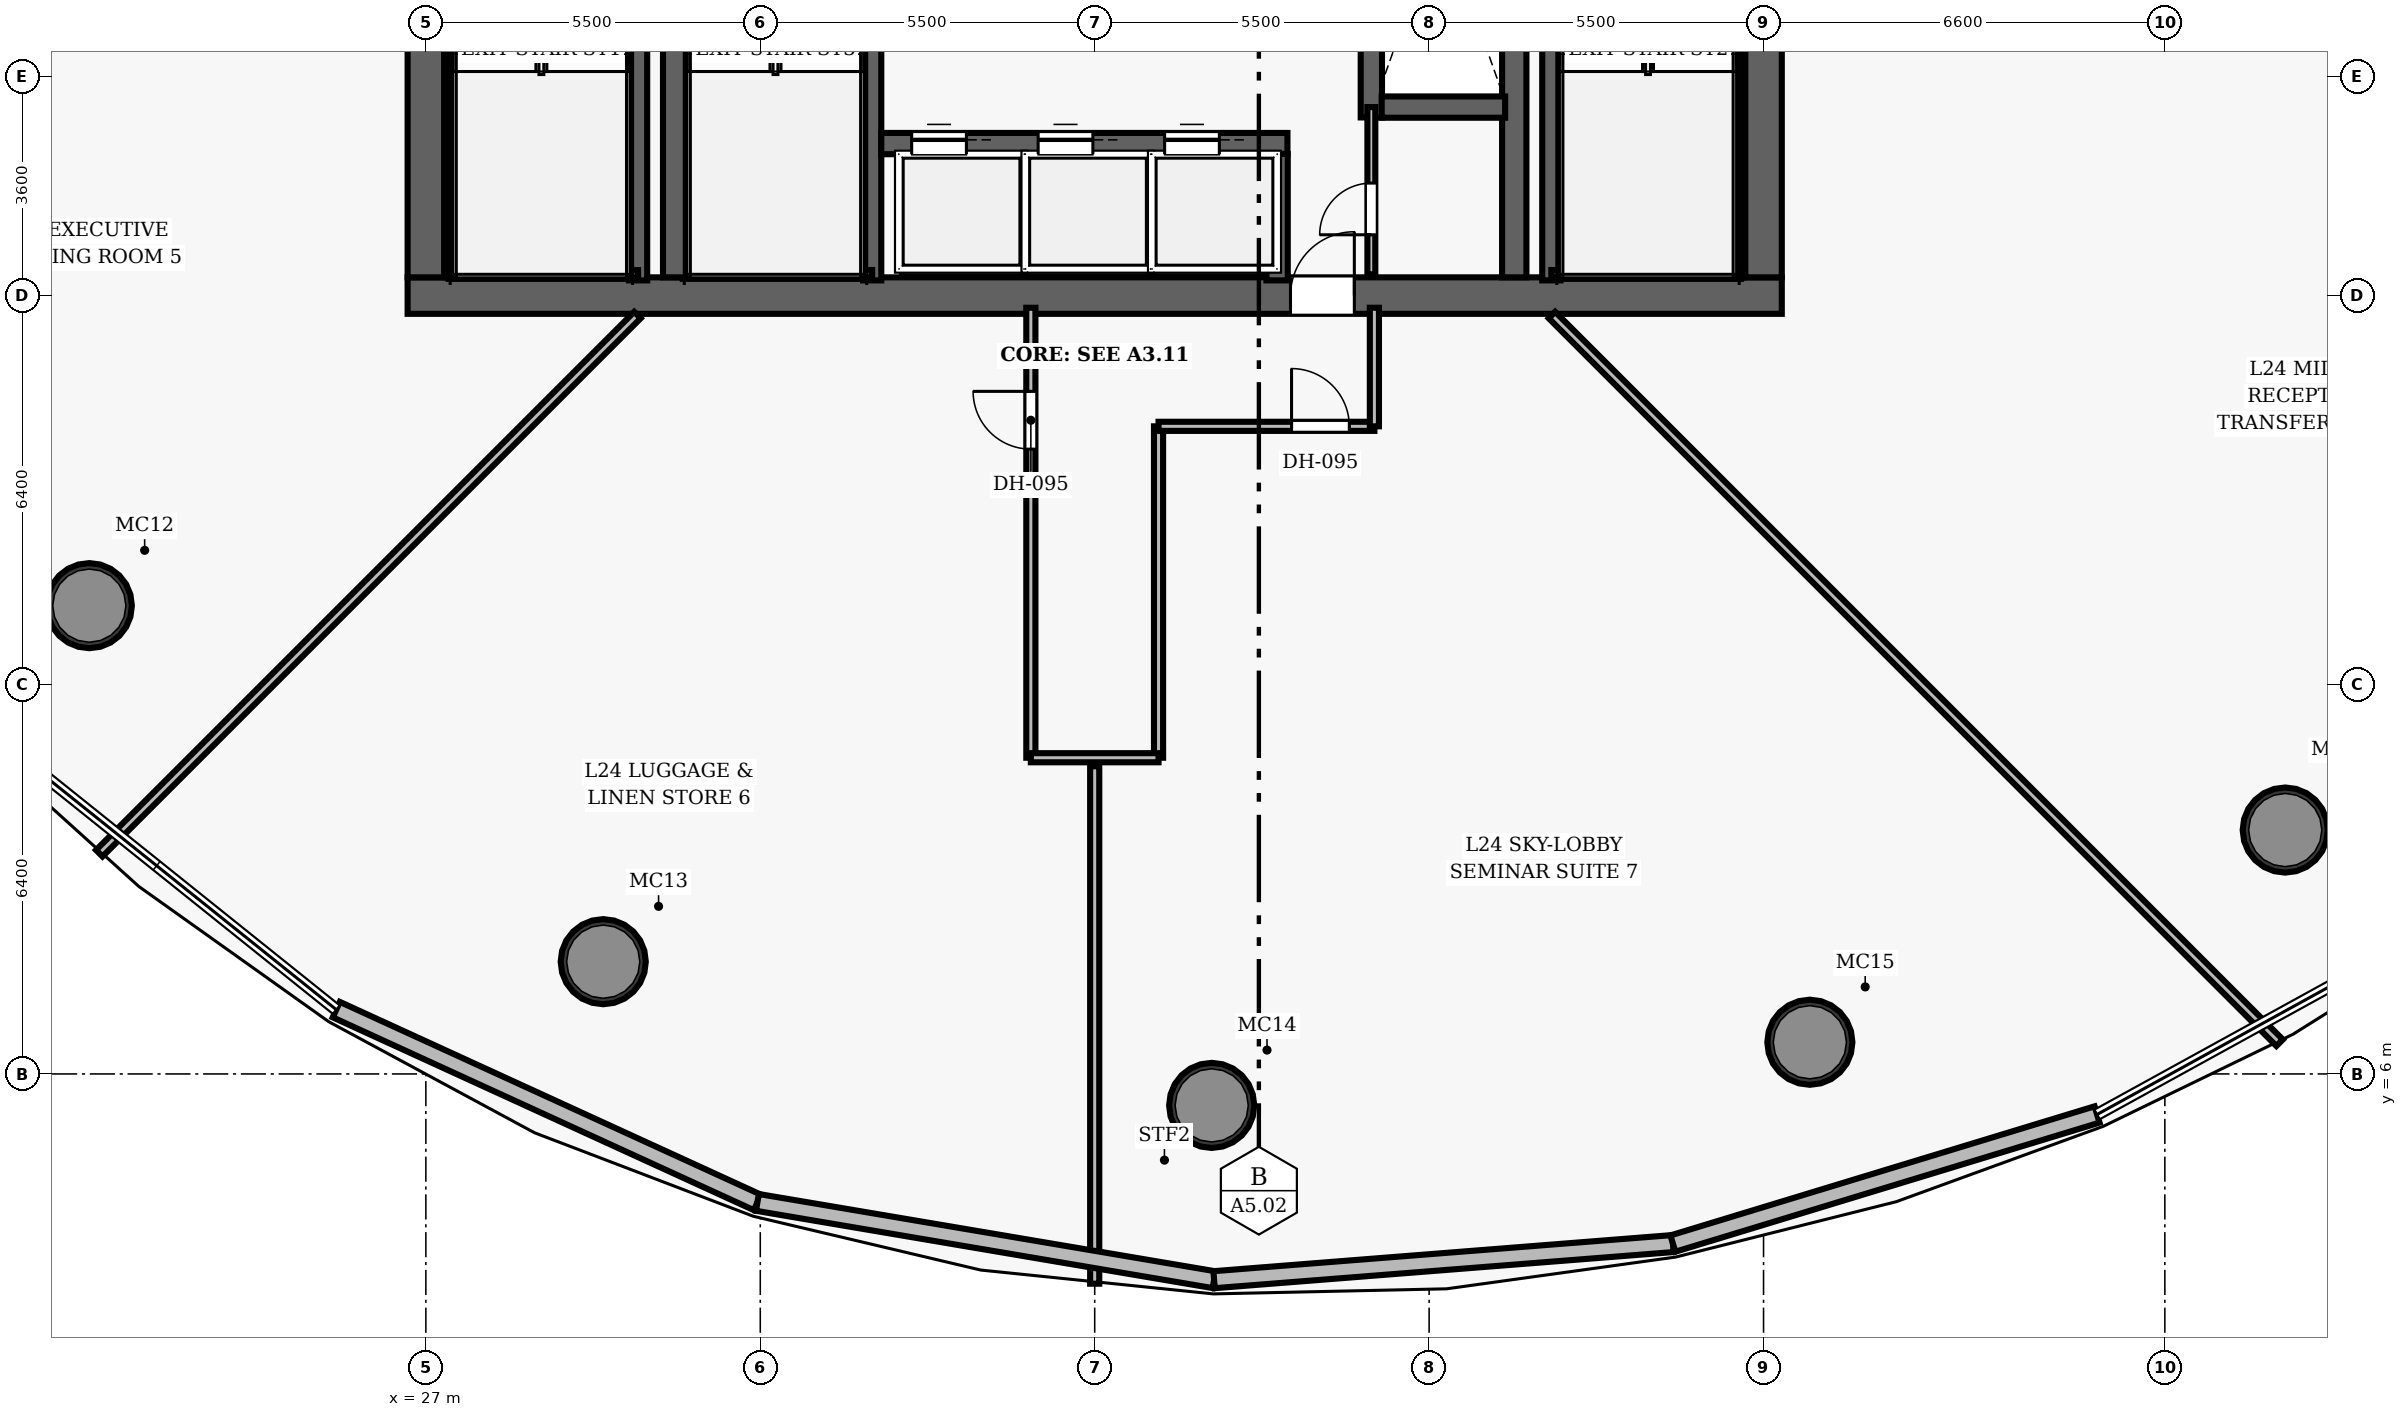
"""IFC4 building model, lengths in metres.
Left out: names, types, materials, properties, quantities, classifications, styles, units other than length and angle.
Written with IfcOpenShell. Run it as: python <this file> out.ifc"""

import sys

from ifc_helpers import new_model, si_unit, direction, frame, frame_2d, origin, origin_2d, place, context, subcontext, project, spatial, rectangle, hollow_circle, extrude, element, fill, save


model = new_model("IFC4")
c1 = context("Model", 3, precision=1e-05, world=origin(), true_north=direction((0.0, 1.0)))
c2 = subcontext(c1, "Body", "Model", "MODEL_VIEW")
j1 = project(units=[si_unit("LENGTHUNIT", "METRE"), si_unit("PLANEANGLEUNIT", "RADIAN")], contexts=[c1])
p1 = place(None, origin())
s1 = spatial("IfcSite", under=j1, at=p1, CompositionType="ELEMENT")
p2 = place(p1, origin())
s2 = spatial("IfcBuilding", under=s1, at=p2, CompositionType="ELEMENT")
p3 = place(p2, frame((0.0, 0.0, 102.8)))
s3 = spatial("IfcBuildingStorey", under=s2, at=p3, CompositionType="ELEMENT", Elevation=102.8)
p4 = place(p3, frame((26.7, 18.8, 0.0), z_axis=(0.0, 0.0, 1.0), x_axis=(1.0, 0.0, 0.0)))
e1 = element("IfcWall", 1, at=p4, inside=s3, PredefinedType="SHEAR", context=c2, shape_type="SweptSolid", body=[
    extrude(rectangle(XDim=22.6, YDim=0.6, at=frame_2d((11.3, 0.0))), origin(), (0.0, 0.0, 1.0), 3.5),
])
p5 = place(p4, frame((14.52, 0.0, 0.0)))
e2 = element("IfcOpeningElement", 2, at=p5, cuts=e1, PredefinedType="OPENING", context=c2, shape_type="SweptSolid", body=[
    extrude(rectangle(XDim=1.05, YDim=2.15, at=frame_2d((0.525, 1.075))), frame((0.0, 0.31, 0.0), z_axis=(0.0, -1.0, 0.0), x_axis=(1.0, 0.0, 0.0)), (0.0, 0.0, 1.0), 0.62),
])
p6 = place(p3, frame((27.0, 19.1, 0.0), z_axis=(0.0, 0.0, 1.0), x_axis=(0.0, 1.0, 0.0)))
e3 = element("IfcWall", 3, at=p6, inside=s3, PredefinedType="SHEAR", context=c2, shape_type="SweptSolid", body=[
    extrude(rectangle(XDim=13.8, YDim=0.6, at=frame_2d((6.9, 0.0))), origin(), (0.0, 0.0, 1.0), 3.5),
])
p7 = place(p6, frame((8.2, 0.0, 0.0)))
e4 = element("IfcOpeningElement", 4, at=p7, cuts=e3, PredefinedType="OPENING", context=c2, shape_type="SweptSolid", body=[
    extrude(rectangle(XDim=1.05, YDim=2.15, at=frame_2d((0.525, 1.075))), frame((0.0, 0.31, 0.0), z_axis=(0.0, -1.0, 0.0), x_axis=(1.0, 0.0, 0.0)), (0.0, 0.0, 1.0), 0.62),
])
p8 = place(p3, frame((49.0, 19.1, 0.0), z_axis=(0.0, 0.0, 1.0), x_axis=(0.0, 1.0, 0.0)))
e5 = element("IfcWall", 5, at=p8, inside=s3, PredefinedType="SHEAR", context=c2, shape_type="SweptSolid", body=[
    extrude(rectangle(XDim=13.8, YDim=0.6, at=frame_2d((6.9, 0.0))), origin(), (0.0, 0.0, 1.0), 3.5),
])
p9 = place(p8, frame((8.2, 0.0, 0.0)))
e6 = element("IfcOpeningElement", 6, at=p9, cuts=e5, PredefinedType="OPENING", context=c2, shape_type="SweptSolid", body=[
    extrude(rectangle(XDim=1.05, YDim=2.15, at=frame_2d((0.525, 1.075))), frame((0.0, 0.31, 0.0), z_axis=(0.0, -1.0, 0.0), x_axis=(1.0, 0.0, 0.0)), (0.0, 0.0, 1.0), 0.62),
])
for number, where, z_axis, x_axis in (
    (7, (31.1, 19.1, 0.0), (0.0, 0.0, 1.0), (0.0, 1.0, 0.0)),
    (8, (44.9, 19.1, 0.0), (0.0, 0.0, 1.0), (0.0, 1.0, 0.0)),
):
    element("IfcWall", number, at=place(p3, frame(where, z_axis=z_axis, x_axis=x_axis)), inside=s3, PredefinedType="SHEAR", context=c2, shape_type="SweptSolid", body=[
        extrude(rectangle(XDim=13.8, YDim=0.4, at=frame_2d((6.9, 0.0))), origin(), (0.0, 0.0, 1.0), 3.5),
    ])
for number, where, z_axis, x_axis in (
    (9, (21.465, 13.701, 0.0), (0.0, 0.0, 1.0), (1.0, 0.0, 0.0)),
    (10, (29.917, 7.846, 0.0), (0.0, 0.0, 1.0), (1.0, 0.0, 0.0)),
    (11, (39.924, 5.483, 0.0), (0.0, 0.0, 1.0), (1.0, 0.0, 0.0)),
    (12, (49.762, 6.521, 0.0), (0.0, 0.0, 1.0), (1.0, 0.0, 0.0)),
    (13, (57.58, 10.011, 0.0), (0.0, 0.0, 1.0), (1.0, 0.0, 0.0)),
):
    element("IfcColumn", number, at=place(p3, frame(where, z_axis=z_axis, x_axis=x_axis)), inside=s3, PredefinedType="COLUMN", context=c2, shape_type="SweptSolid", body=[
        extrude(hollow_circle(Radius=0.7, WallThickness=0.055, at=origin_2d()), origin(), (0.0, 0.0, 1.0), 3.5),
    ])
p10 = place(p3, frame((30.49, 19.05, 0.0), z_axis=(0.0, 0.0, 1.0), x_axis=(0.0, 1.0, 0.0)))
e14 = element("IfcWall", 14, at=p10, inside=s3, PredefinedType="SHEAR", context=c2, shape_type="SweptSolid", body=[
    extrude(rectangle(XDim=7.5, YDim=0.3, at=frame_2d((3.75, 0.0))), origin(), (0.0, 0.0, 1.0), 3.5),
])
p11 = place(p3, frame((27.395, 19.1, 0.0), z_axis=(0.0, 0.0, 1.0), x_axis=(0.0, 1.0, 0.0)))
e15 = element("IfcWall", 15, at=p11, inside=s3, PredefinedType="SHEAR", context=c2, shape_type="SweptSolid", body=[
    extrude(rectangle(XDim=7.45, YDim=0.12, at=frame_2d((3.725, 0.0))), origin(), (0.0, 0.0, 1.0), 3.5),
])
p12 = place(p3, frame((27.395, 19.16, 0.0), z_axis=(0.0, 0.0, 1.0), x_axis=(1.0, 0.0, 0.0)))
e16 = element("IfcWall", 16, at=p12, inside=s3, PredefinedType="SHEAR", context=c2, shape_type="SweptSolid", body=[
    extrude(rectangle(XDim=3.095, YDim=0.12, at=frame_2d((1.547, 0.0))), origin(), (0.0, 0.0, 1.0), 3.5),
])
p13 = place(p3, frame((45.51, 19.05, 0.0), z_axis=(0.0, 0.0, 1.0), x_axis=(0.0, 1.0, 0.0)))
e17 = element("IfcWall", 17, at=p13, inside=s3, PredefinedType="SHEAR", context=c2, shape_type="SweptSolid", body=[
    extrude(rectangle(XDim=7.5, YDim=0.3, at=frame_2d((3.75, 0.0))), origin(), (0.0, 0.0, 1.0), 3.5),
])
p14 = place(p3, frame((48.605, 19.1, 0.0), z_axis=(0.0, 0.0, 1.0), x_axis=(0.0, 1.0, 0.0)))
e18 = element("IfcWall", 18, at=p14, inside=s3, PredefinedType="SHEAR", context=c2, shape_type="SweptSolid", body=[
    extrude(rectangle(XDim=7.45, YDim=0.12, at=frame_2d((3.725, 0.0))), origin(), (0.0, 0.0, 1.0), 3.5),
])
p15 = place(p3, frame((45.51, 19.16, 0.0), z_axis=(0.0, 0.0, 1.0), x_axis=(1.0, 0.0, 0.0)))
e19 = element("IfcWall", 19, at=p15, inside=s3, PredefinedType="SHEAR", context=c2, shape_type="SweptSolid", body=[
    extrude(rectangle(XDim=3.095, YDim=0.12, at=frame_2d((1.547, 0.0))), origin(), (0.0, 0.0, 1.0), 3.5),
])
p16 = place(p3, frame((34.34, 19.05, 0.0), z_axis=(0.0, 0.0, 1.0), x_axis=(0.0, 1.0, 0.0)))
e20 = element("IfcWall", 20, at=p16, inside=s3, PredefinedType="SHEAR", context=c2, shape_type="SweptSolid", body=[
    extrude(rectangle(XDim=7.5, YDim=0.3, at=frame_2d((3.75, 0.0))), origin(), (0.0, 0.0, 1.0), 3.5),
])
p17 = place(p3, frame((31.3, 19.16, 0.0), z_axis=(0.0, 0.0, 1.0), x_axis=(1.0, 0.0, 0.0)))
e21 = element("IfcWall", 21, at=p17, inside=s3, PredefinedType="SHEAR", context=c2, shape_type="SweptSolid", body=[
    extrude(rectangle(XDim=3.04, YDim=0.12, at=frame_2d((1.52, 0.0))), origin(), (0.0, 0.0, 1.0), 3.5),
])
p18 = place(p3, frame((42.55, 21.73, 0.0), z_axis=(0.0, 0.0, 1.0), x_axis=(0.0, 1.0, 0.0)))
e22 = element("IfcWall", 22, at=p18, inside=s3, PredefinedType="SHEAR", context=c2, shape_type="SweptSolid", body=[
    extrude(rectangle(XDim=6.54, YDim=0.35, at=frame_2d((3.27, 0.0))), origin(), (0.0, 0.0, 1.0), 2.675),
])
p19 = place(p3, frame((42.72, 21.9, 0.0), z_axis=(0.0, 0.0, 1.0), x_axis=(1.0, 0.0, 0.0)))
e23 = element("IfcWall", 23, at=p19, inside=s3, PredefinedType="SHEAR", context=c2, shape_type="SweptSolid", body=[
    extrude(rectangle(XDim=2.03, YDim=0.35, at=frame_2d((1.015, 0.0))), origin(), (0.0, 0.0, 1.0), 2.675),
])
p20 = place(p3, frame((34.49, 21.3, 0.0), z_axis=(0.0, 0.0, 1.0), x_axis=(1.0, 0.0, 0.0)))
e24 = element("IfcWall", 24, at=p20, inside=s3, PredefinedType="SHEAR", context=c2, shape_type="SweptSolid", body=[
    extrude(rectangle(XDim=6.68, YDim=0.35, at=frame_2d((3.34, 0.0))), origin(), (0.0, 0.0, 1.0), 2.675),
])
p21 = place(p20, frame((0.5, 0.0, 0.0)))
e25 = element("IfcOpeningElement", 25, at=p21, cuts=e24, PredefinedType="OPENING", context=c2, shape_type="SweptSolid", body=[
    extrude(rectangle(XDim=0.9, YDim=2.15, at=frame_2d((0.45, 1.075))), frame((0.0, 0.185, 0.0), z_axis=(0.0, -1.0, 0.0), x_axis=(1.0, 0.0, 0.0)), (0.0, 0.0, 1.0), 0.37),
])
p22 = place(p20, frame((2.58, 0.0, 0.0)))
e26 = element("IfcOpeningElement", 26, at=p22, cuts=e24, PredefinedType="OPENING", context=c2, shape_type="SweptSolid", body=[
    extrude(rectangle(XDim=0.9, YDim=2.15, at=frame_2d((0.45, 1.075))), frame((0.0, 0.185, 0.0), z_axis=(0.0, -1.0, 0.0), x_axis=(1.0, 0.0, 0.0)), (0.0, 0.0, 1.0), 0.37),
])
p23 = place(p20, frame((4.66, 0.0, 0.0)))
e27 = element("IfcOpeningElement", 27, at=p23, cuts=e24, PredefinedType="OPENING", context=c2, shape_type="SweptSolid", body=[
    extrude(rectangle(XDim=0.9, YDim=2.15, at=frame_2d((0.45, 1.075))), frame((0.0, 0.185, 0.0), z_axis=(0.0, -1.0, 0.0), x_axis=(1.0, 0.0, 0.0)), (0.0, 0.0, 1.0), 0.37),
])
p24 = place(p3, frame((41.0, 19.05, 0.0), z_axis=(0.0, 0.0, 1.0), x_axis=(0.0, 1.0, 0.0)))
e28 = element("IfcWall", 28, at=p24, inside=s3, PredefinedType="SHEAR", context=c2, shape_type="SweptSolid", body=[
    extrude(rectangle(XDim=2.08, YDim=0.35, at=frame_2d((1.04, 0.0))), origin(), (0.0, 0.0, 1.0), 2.675),
])
p25 = place(p3, frame((42.55, 19.15, 0.0), z_axis=(0.0, 0.0, 1.0), x_axis=(0.0, 1.0, 0.0)))
e29 = element("IfcWall", 29, at=p25, inside=s3, PredefinedType="PARTITIONING", context=c2, shape_type="SweptSolid", body=[
    extrude(rectangle(XDim=2.75, YDim=0.13, at=frame_2d((1.375, 0.0))), origin(), (0.0, 0.0, 1.0), 2.675),
])
p26 = place(p25, frame((0.65, 0.0, 0.0)))
e30 = element("IfcOpeningElement", 30, at=p26, cuts=e29, PredefinedType="OPENING", context=c2, shape_type="SweptSolid", body=[
    extrude(rectangle(XDim=0.85, YDim=2.1, at=frame_2d((0.425, 1.05))), frame((0.0, 0.075, 0.0), z_axis=(0.0, -1.0, 0.0), x_axis=(1.0, 0.0, 0.0)), (0.0, 0.0, 1.0), 0.15),
])
p27 = place(p3, frame((36.95, 11.2, 0.0), z_axis=(0.0, 0.0, 1.0), x_axis=(0.0, 1.0, 0.0)))
e31 = element("IfcWall", 31, at=p27, inside=s3, PredefinedType="PARTITIONING", context=c2, shape_type="SweptSolid", body=[
    extrude(rectangle(XDim=7.4, YDim=0.15, at=frame_2d((3.7, 0.0))), origin(), (0.0, 0.0, 1.0), 2.675),
])
p28 = place(p27, frame((5.075, 0.0, 0.0)))
e32 = element("IfcOpeningElement", 32, at=p28, cuts=e31, PredefinedType="OPENING", context=c2, shape_type="SweptSolid", body=[
    extrude(rectangle(XDim=0.95, YDim=2.15, at=frame_2d((0.475, 1.075))), frame((0.0, 0.085, 0.0), z_axis=(0.0, -1.0, 0.0), x_axis=(1.0, 0.0, 0.0)), (0.0, 0.0, 1.0), 0.17),
])
p29 = place(p3, frame((39.05, 11.2, 0.0), z_axis=(0.0, 0.0, 1.0), x_axis=(0.0, 1.0, 0.0)))
e33 = element("IfcWall", 33, at=p29, inside=s3, PredefinedType="PARTITIONING", context=c2, shape_type="SweptSolid", body=[
    extrude(rectangle(XDim=5.45, YDim=0.15, at=frame_2d((2.725, 0.0))), origin(), (0.0, 0.0, 1.0), 2.675),
])
p30 = place(p3, frame((39.05, 16.65, 0.0), z_axis=(0.0, 0.0, 1.0), x_axis=(1.0, 0.0, 0.0)))
e34 = element("IfcWall", 34, at=p30, inside=s3, PredefinedType="PARTITIONING", context=c2, shape_type="SweptSolid", body=[
    extrude(rectangle(XDim=3.55, YDim=0.15, at=frame_2d((1.775, 0.0))), origin(), (0.0, 0.0, 1.0), 2.675),
])
p31 = place(p30, frame((2.188, 0.0, 0.0)))
e35 = element("IfcOpeningElement", 35, at=p31, cuts=e34, PredefinedType="OPENING", context=c2, shape_type="SweptSolid", body=[
    extrude(rectangle(XDim=0.95, YDim=2.15, at=frame_2d((0.475, 1.075))), frame((0.0, 0.085, 0.0), z_axis=(0.0, -1.0, 0.0), x_axis=(1.0, 0.0, 0.0)), (0.0, 0.0, 1.0), 0.17),
])
p32 = place(p3, frame((42.6, 16.65, 0.0), z_axis=(0.0, 0.0, 1.0), x_axis=(0.0, 1.0, 0.0)))
e36 = element("IfcWall", 36, at=p32, inside=s3, PredefinedType="PARTITIONING", context=c2, shape_type="SweptSolid", body=[
    extrude(rectangle(XDim=1.95, YDim=0.15, at=frame_2d((0.975, 0.0))), origin(), (0.0, 0.0, 1.0), 2.675),
])
p33 = place(p3, frame((36.95, 11.2, 0.0), z_axis=(0.0, 0.0, 1.0), x_axis=(1.0, 0.0, 0.0)))
e37 = element("IfcWall", 37, at=p33, inside=s3, PredefinedType="PARTITIONING", context=c2, shape_type="SweptSolid", body=[
    extrude(rectangle(XDim=2.1, YDim=0.15, at=frame_2d((1.05, 0.0))), origin(), (0.0, 0.0, 1.0), 2.675),
])
p34 = place(p3, frame((30.48, 18.48, 0.0), z_axis=(0.0, 0.0, 1.0), x_axis=(-0.707106781187, -0.707106781187, 0.0)))
e38 = element("IfcWall", 38, at=p34, inside=s3, PredefinedType="PARTITIONING", context=c2, shape_type="SweptSolid", body=[
    extrude(rectangle(XDim=12.518, YDim=0.15, at=frame_2d((6.259, 0.0))), origin(), (0.0, 0.0, 1.0), 2.675),
])
p35 = place(p3, frame((38.0, 11.06, 0.0), z_axis=(0.0, 0.0, 1.0), x_axis=(0.0, -1.0, 0.0)))
e39 = element("IfcWall", 39, at=p35, inside=s3, PredefinedType="PARTITIONING", context=c2, shape_type="SweptSolid", body=[
    extrude(rectangle(XDim=8.51, YDim=0.15, at=frame_2d((4.255, 0.0))), origin(), (0.0, 0.0, 1.0), 2.675),
])
p36 = place(p3, frame((45.52, 18.48, 0.0), z_axis=(0.0, 0.0, 1.0), x_axis=(0.707106781187, -0.707106781187, 0.0)))
e40 = element("IfcWall", 40, at=p36, inside=s3, PredefinedType="PARTITIONING", context=c2, shape_type="SweptSolid", body=[
    extrude(rectangle(XDim=16.924, YDim=0.15, at=frame_2d((8.462, 0.0))), origin(), (0.0, 0.0, 1.0), 2.675),
])
p37 = place(p3, frame((32.453, 3.887, 0.0), z_axis=(0.0, 0.0, 1.0), x_axis=(-0.909252391781, 0.416245225847, 0.0)))
e41 = element("IfcWall", 41, at=p37, inside=s3, PredefinedType="SOLIDWALL", context=c2, shape_type="SweptSolid", body=[
    extrude(rectangle(XDim=7.617, YDim=0.28, at=frame_2d((3.809, 0.0))), origin(), (0.0, 0.0, 1.0), 3.26),
])
p38 = place(p3, frame((39.963, 2.616, 0.0), z_axis=(0.0, 0.0, 1.0), x_axis=(-0.985987293263, 0.166820434971, 0.0)))
e42 = element("IfcWall", 42, at=p38, inside=s3, PredefinedType="SOLIDWALL", context=c2, shape_type="SweptSolid", body=[
    extrude(rectangle(XDim=7.617, YDim=0.28, at=frame_2d((3.809, 0.0))), origin(), (0.0, 0.0, 1.0), 3.26),
])
p39 = place(p3, frame((47.509, 3.21, 0.0), z_axis=(0.0, 0.0, 1.0), x_axis=(-0.996916103358, -0.078474727561, 0.0)))
e43 = element("IfcWall", 43, at=p39, inside=s3, PredefinedType="SOLIDWALL", context=c2, shape_type="SweptSolid", body=[
    extrude(rectangle(XDim=7.569, YDim=0.28, at=frame_2d((3.785, 0.0))), origin(), (0.0, 0.0, 1.0), 3.26),
])
p40 = place(p3, frame((54.485, 5.333, 0.0), z_axis=(0.0, 0.0, 1.0), x_axis=(-0.95668726025, -0.291117649887, 0.0)))
e44 = element("IfcWall", 44, at=p40, inside=s3, PredefinedType="SOLIDWALL", context=c2, shape_type="SweptSolid", body=[
    extrude(rectangle(XDim=7.292, YDim=0.28, at=frame_2d((3.646, 0.0))), origin(), (0.0, 0.0, 1.0), 3.26),
])
p41 = place(p5, origin())
e45 = element("IfcDoor", 45, at=p41, inside=s3, OperationType="SINGLE_SWING_RIGHT", PredefinedType="DOOR", context=c2, shape_type="SweptSolid", body=[
    extrude(rectangle(XDim=1.05, YDim=2.15, at=frame_2d((0.525, 1.075))), frame((0.0, 0.025, 0.0), z_axis=(0.0, -1.0, 0.0), x_axis=(1.0, 0.0, 0.0)), (0.0, 0.0, 1.0), 0.05),
])
fill(e2, e45)
p42 = place(p26, origin())
e46 = element("IfcDoor", 46, at=p42, inside=s3, OperationType="SINGLE_SWING_LEFT", PredefinedType="DOOR", context=c2, shape_type="SweptSolid", body=[
    extrude(rectangle(XDim=0.85, YDim=2.1, at=frame_2d((0.425, 1.05))), frame((0.0, 0.025, 0.0), z_axis=(0.0, -1.0, 0.0), x_axis=(1.0, 0.0, 0.0)), (0.0, 0.0, 1.0), 0.05),
])
fill(e30, e46)
p43 = place(p28, origin())
e47 = element("IfcDoor", 47, at=p43, inside=s3, OperationType="SINGLE_SWING_RIGHT", PredefinedType="DOOR", context=c2, shape_type="SweptSolid", body=[
    extrude(rectangle(XDim=0.95, YDim=2.15, at=frame_2d((0.475, 1.075))), frame((0.0, 0.025, 0.0), z_axis=(0.0, -1.0, 0.0), x_axis=(1.0, 0.0, 0.0)), (0.0, 0.0, 1.0), 0.05),
])
fill(e32, e47)
p44 = place(p31, origin())
e48 = element("IfcDoor", 48, at=p44, inside=s3, OperationType="SINGLE_SWING_LEFT", PredefinedType="DOOR", context=c2, shape_type="SweptSolid", body=[
    extrude(rectangle(XDim=0.95, YDim=2.15, at=frame_2d((0.475, 1.075))), frame((0.0, 0.025, 0.0), z_axis=(0.0, -1.0, 0.0), x_axis=(1.0, 0.0, 0.0)), (0.0, 0.0, 1.0), 0.05),
])
fill(e35, e48)
p45 = place(p21, origin())
e49 = element("IfcDoor", 49, at=p45, inside=s3, OperationType="SLIDING_TO_LEFT", PredefinedType="DOOR", context=c2, shape_type="SweptSolid", body=[
    extrude(rectangle(XDim=0.9, YDim=2.15, at=frame_2d((0.45, 1.075))), frame((0.0, 0.025, 0.0), z_axis=(0.0, -1.0, 0.0), x_axis=(1.0, 0.0, 0.0)), (0.0, 0.0, 1.0), 0.05),
])
fill(e25, e49)
p46 = place(p22, origin())
e50 = element("IfcDoor", 50, at=p46, inside=s3, OperationType="SLIDING_TO_LEFT", PredefinedType="DOOR", context=c2, shape_type="SweptSolid", body=[
    extrude(rectangle(XDim=0.9, YDim=2.15, at=frame_2d((0.45, 1.075))), frame((0.0, 0.025, 0.0), z_axis=(0.0, -1.0, 0.0), x_axis=(1.0, 0.0, 0.0)), (0.0, 0.0, 1.0), 0.05),
])
fill(e26, e50)
p47 = place(p23, origin())
e51 = element("IfcDoor", 51, at=p47, inside=s3, OperationType="SLIDING_TO_LEFT", PredefinedType="DOOR", context=c2, shape_type="SweptSolid", body=[
    extrude(rectangle(XDim=0.9, YDim=2.15, at=frame_2d((0.45, 1.075))), frame((0.0, 0.025, 0.0), z_axis=(0.0, -1.0, 0.0), x_axis=(1.0, 0.0, 0.0)), (0.0, 0.0, 1.0), 0.05),
])
fill(e27, e51)
save(model, sys.argv[1])
